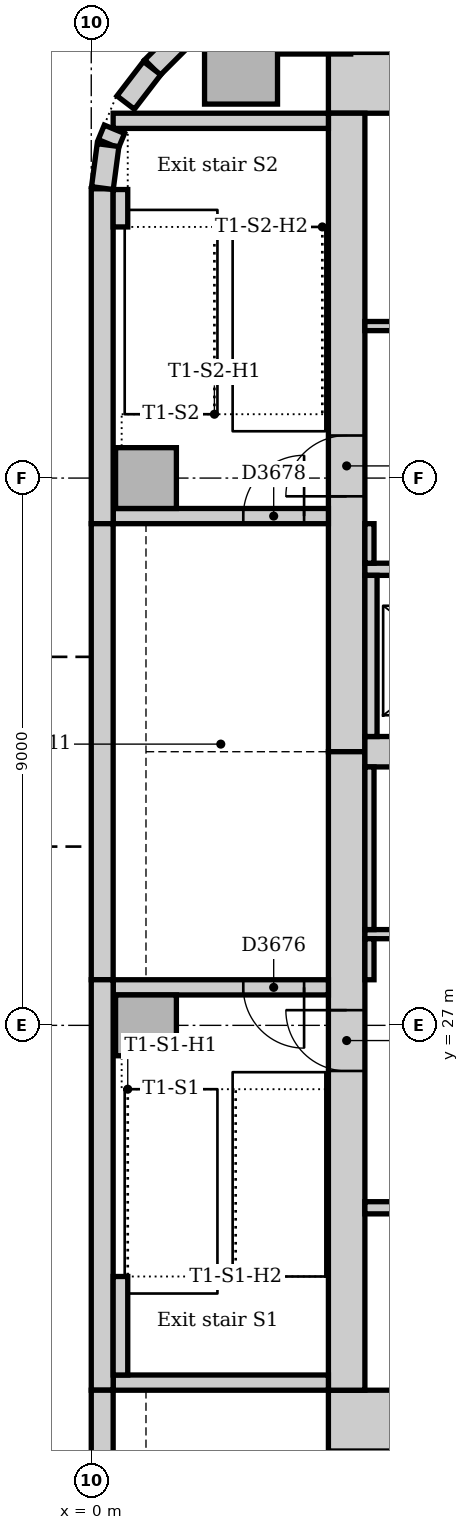
"""IFC4 building model, lengths in metres.
Left out: names, types, materials, properties, quantities, classifications, styles, units other than length and angle.
Written with IfcOpenShell. Run it as: python <this file> out.ifc"""

import sys

from ifc_helpers import new_model, si_unit, direction, frame, frame_2d, origin, origin_2d, place, context, subcontext, project, spatial, rectangle, extrude, element, fill, save


model = new_model("IFC4")
c1 = context("Model", 3, precision=1e-05, world=origin(), true_north=direction((0.0, 1.0)))
c2 = subcontext(c1, "Body", "Model", "MODEL_VIEW")
j1 = project(units=[si_unit("LENGTHUNIT", "METRE"), si_unit("PLANEANGLEUNIT", "RADIAN")], contexts=[c1])
p1 = place(None, origin())
s1 = spatial("IfcSite", under=j1, at=p1, CompositionType="ELEMENT")
p2 = place(p1, origin())
s2 = spatial("IfcBuilding", under=s1, at=p2, CompositionType="ELEMENT")
p3 = place(p2, frame((0.0, 0.0, 75.0)))
s3 = spatial("IfcBuildingStorey", under=s2, at=p3, CompositionType="ELEMENT", Elevation=75.0)
for number, where, z_axis, x_axis in (
    (1, (3.9, 20.5, 0.0), (0.0, 0.0, 1.0), (1.0, 0.0, 0.0)),
    (2, (23.5, 42.5, 0.0), (0.0, 0.0, 1.0), (-1.0, 0.0, 0.0)),
):
    element("IfcWall", number, at=place(p3, frame(where, z_axis=z_axis, x_axis=x_axis)), inside=s3, PredefinedType="SOLIDWALL", context=c2, shape_type="SweptSolid", body=[
        extrude(rectangle(XDim=19.6, YDim=1.0, at=frame_2d((9.8, 0.0))), origin(), (0.0, 0.0, 1.0), 4.0),
    ])
p4 = place(p3, frame((4.2, 42.0, 0.0), z_axis=(0.0, 0.0, 1.0), x_axis=(0.0, -1.0, 0.0)))
e3 = element("IfcWall", 3, at=p4, inside=s3, PredefinedType="SOLIDWALL", context=c2, shape_type="SweptSolid", body=[
    extrude(rectangle(XDim=10.5, YDim=0.6, at=frame_2d((5.25, 0.0))), origin(), (0.0, 0.0, 1.0), 4.0),
])
p5 = place(p4, frame((5.3, 0.0, 0.0)))
e4 = element("IfcOpeningElement", 4, at=p5, cuts=e3, PredefinedType="OPENING", context=c2, shape_type="SweptSolid", body=[
    extrude(rectangle(XDim=1.0, YDim=2.1, at=frame_2d((0.5, 1.05))), frame((0.0, 0.31, 0.0), z_axis=(0.0, -1.0, 0.0), x_axis=(1.0, 0.0, 0.0)), (0.0, 0.0, 1.0), 0.62),
])
p6 = place(p3, frame((4.2, 31.5, 0.0), z_axis=(0.0, 0.0, 1.0), x_axis=(0.0, -1.0, 0.0)))
e5 = element("IfcWall", 5, at=p6, inside=s3, PredefinedType="SOLIDWALL", context=c2, shape_type="SweptSolid", body=[
    extrude(rectangle(XDim=10.5, YDim=0.6, at=frame_2d((5.25, 0.0))), origin(), (0.0, 0.0, 1.0), 4.0),
])
p7 = place(p6, frame((4.25, 0.0, 0.0)))
e6 = element("IfcOpeningElement", 6, at=p7, cuts=e5, PredefinedType="OPENING", context=c2, shape_type="SweptSolid", body=[
    extrude(rectangle(XDim=1.0, YDim=2.1, at=frame_2d((0.5, 1.05))), frame((0.0, 0.31, 0.0), z_axis=(0.0, -1.0, 0.0), x_axis=(1.0, 0.0, 0.0)), (0.0, 0.0, 1.0), 0.62),
])
p8 = place(p3, frame((4.5, 31.5, 0.0), z_axis=(0.0, 0.0, 1.0), x_axis=(1.0, 0.0, 0.0)))
e7 = element("IfcWall", 7, at=p8, inside=s3, PredefinedType="SOLIDWALL", context=c2, shape_type="SweptSolid", body=[
    extrude(rectangle(XDim=18.0, YDim=0.5, at=frame_2d((9.0, 0.0))), origin(), (0.0, 0.0, 1.0), 4.0),
])
p9 = place(p3, frame((0.36, 21.125, 0.0), z_axis=(0.0, 0.0, 1.0), x_axis=(1.0, 0.0, 0.0)))
e8 = element("IfcWall", 8, at=p9, inside=s3, PredefinedType="SOLIDWALL", context=c2, shape_type="SweptSolid", body=[
    extrude(rectangle(XDim=3.54, YDim=0.25, at=frame_2d((1.77, 0.0))), origin(), (0.0, 0.0, 1.0), 4.0),
])
p10 = place(p3, frame((3.9, 27.625, 0.0), z_axis=(0.0, 0.0, 1.0), x_axis=(-1.0, 0.0, 0.0)))
e9 = element("IfcWall", 9, at=p10, inside=s3, PredefinedType="SOLIDWALL", context=c2, shape_type="SweptSolid", body=[
    extrude(rectangle(XDim=3.54, YDim=0.25, at=frame_2d((1.77, 0.0))), origin(), (0.0, 0.0, 1.0), 4.0),
])
p11 = place(p10, frame((0.4, 0.0, 0.0)))
e10 = element("IfcOpeningElement", 10, at=p11, cuts=e9, PredefinedType="OPENING", context=c2, shape_type="SweptSolid", body=[
    extrude(rectangle(XDim=1.0, YDim=2.1, at=frame_2d((0.5, 1.05))), frame((0.0, 0.135, 0.0), z_axis=(0.0, -1.0, 0.0), x_axis=(1.0, 0.0, 0.0)), (0.0, 0.0, 1.0), 0.27),
])
p12 = place(p3, frame((0.36, 35.375, 0.0), z_axis=(0.0, 0.0, 1.0), x_axis=(1.0, 0.0, 0.0)))
e11 = element("IfcWall", 11, at=p12, inside=s3, PredefinedType="SOLIDWALL", context=c2, shape_type="SweptSolid", body=[
    extrude(rectangle(XDim=3.54, YDim=0.25, at=frame_2d((1.77, 0.0))), origin(), (0.0, 0.0, 1.0), 4.0),
])
p13 = place(p12, frame((2.14, 0.0, 0.0)))
e12 = element("IfcOpeningElement", 12, at=p13, cuts=e11, PredefinedType="OPENING", context=c2, shape_type="SweptSolid", body=[
    extrude(rectangle(XDim=1.0, YDim=2.1, at=frame_2d((0.5, 1.05))), frame((0.0, 0.135, 0.0), z_axis=(0.0, -1.0, 0.0), x_axis=(1.0, 0.0, 0.0)), (0.0, 0.0, 1.0), 0.27),
])
p14 = place(p3, frame((3.9, 41.875, 0.0), z_axis=(0.0, 0.0, 1.0), x_axis=(-1.0, 0.0, 0.0)))
e13 = element("IfcWall", 13, at=p14, inside=s3, PredefinedType="SOLIDWALL", context=c2, shape_type="SweptSolid", body=[
    extrude(rectangle(XDim=3.54, YDim=0.25, at=frame_2d((1.77, 0.0))), origin(), (0.0, 0.0, 1.0), 4.0),
])
for number, where, z_axis, x_axis in (
    (14, (3.667, 43.574, 0.0), (0.0, 0.0, 1.0), (1.0, 0.0, 0.0)),
    (15, (2.463, 42.75, 0.0), (0.0, 0.0, 1.0), (1.0, 0.0, 0.0)),
):
    element("IfcColumn", number, at=place(p3, frame(where, z_axis=z_axis, x_axis=x_axis)), inside=s3, PredefinedType="COLUMN", context=c2, shape_type="SweptSolid", body=[
        extrude(rectangle(XDim=1.2, YDim=1.2, at=origin_2d()), origin(), (0.0, 0.0, 1.0), 3.85),
    ])
for number, where, z_axis, x_axis in (
    (16, (0.9, 27.0, 0.0), (0.0, 0.0, 1.0), (1.0, 0.0, 0.0)),
    (17, (0.9, 36.0, 0.0), (0.0, 0.0, 1.0), (1.0, 0.0, 0.0)),
):
    element("IfcColumn", number, at=place(p3, frame(where, z_axis=z_axis, x_axis=x_axis)), inside=s3, PredefinedType="COLUMN", context=c2, shape_type="SweptSolid", body=[
        extrude(rectangle(XDim=1.0, YDim=1.0, at=origin_2d()), origin(), (0.0, 0.0, 1.0), 4.0),
    ])
p15 = place(p3, frame((2.249, 43.994, 0.0), z_axis=(0.0, 0.0, 1.0), x_axis=(-0.707106781187, -0.707106781187, 0.0)))
e18 = element("IfcWall", 18, at=p15, inside=s3, PredefinedType="STANDARD", context=c2, shape_type="SweptSolid", body=[
    extrude(rectangle(XDim=1.757, YDim=0.36, at=frame_2d((0.879, 0.0))), origin(), (0.0, 0.0, 1.0), 3.85),
])
p16 = place(p3, frame((0.18, 40.757, 0.0), z_axis=(0.0, 0.0, 1.0), x_axis=(0.0, -1.0, 0.0)))
e19 = element("IfcWall", 19, at=p16, inside=s3, PredefinedType="STANDARD", context=c2, shape_type="SweptSolid", body=[
    extrude(rectangle(XDim=5.507, YDim=0.36, at=frame_2d((2.754, 0.0))), origin(), (0.0, 0.0, 1.0), 3.85),
])
p17 = place(p3, frame((0.18, 35.25, 0.0), z_axis=(0.0, 0.0, 1.0), x_axis=(0.0, -1.0, 0.0)))
e20 = element("IfcWall", 20, at=p17, inside=s3, PredefinedType="STANDARD", context=c2, shape_type="SweptSolid", body=[
    extrude(rectangle(XDim=7.5, YDim=0.36, at=frame_2d((3.75, 0.0))), origin(), (0.0, 0.0, 1.0), 3.85),
])
p18 = place(p3, frame((0.18, 27.75, 0.0), z_axis=(0.0, 0.0, 1.0), x_axis=(0.0, -1.0, 0.0)))
e21 = element("IfcWall", 21, at=p18, inside=s3, PredefinedType="STANDARD", context=c2, shape_type="SweptSolid", body=[
    extrude(rectangle(XDim=6.75, YDim=0.36, at=frame_2d((3.375, 0.0))), origin(), (0.0, 0.0, 1.0), 3.85),
])
p19 = place(p3, frame((0.18, 21.0, 0.0), z_axis=(0.0, 0.0, 1.0), x_axis=(0.0, -1.0, 0.0)))
e22 = element("IfcWall", 22, at=p19, inside=s3, PredefinedType="STANDARD", context=c2, shape_type="SweptSolid", body=[
    extrude(rectangle(XDim=16.757, YDim=0.36, at=frame_2d((8.379, 0.0))), origin(), (0.0, 0.0, 1.0), 3.85),
])
p20 = place(p19, frame((1.35, 0.0, 0.9)))
e23 = element("IfcOpeningElement", 23, at=p20, cuts=e22, PredefinedType="OPENING", context=c2, shape_type="SweptSolid", body=[
    extrude(rectangle(XDim=3.3, YDim=1.6, at=frame_2d((1.65, 0.8))), frame((0.0, 0.19, 0.0), z_axis=(0.0, -1.0, 0.0), x_axis=(1.0, 0.0, 0.0)), (0.0, 0.0, 1.0), 0.38),
])
p21 = place(p19, frame((5.85, 0.0, 0.9)))
e24 = element("IfcOpeningElement", 24, at=p21, cuts=e22, PredefinedType="OPENING", context=c2, shape_type="SweptSolid", body=[
    extrude(rectangle(XDim=3.3, YDim=1.6, at=frame_2d((1.65, 0.8))), frame((0.0, 0.19, 0.0), z_axis=(0.0, -1.0, 0.0), x_axis=(1.0, 0.0, 0.0)), (0.0, 0.0, 1.0), 0.38),
])
p22 = place(p19, frame((10.35, 0.0, 0.9)))
e25 = element("IfcOpeningElement", 25, at=p22, cuts=e22, PredefinedType="OPENING", context=c2, shape_type="SweptSolid", body=[
    extrude(rectangle(XDim=3.3, YDim=1.6, at=frame_2d((1.65, 0.8))), frame((0.0, 0.19, 0.0), z_axis=(0.0, -1.0, 0.0), x_axis=(1.0, 0.0, 0.0)), (0.0, 0.0, 1.0), 0.38),
])
p23 = place(p3, frame((1.0, 42.741, 0.0), z_axis=(0.0, 0.0, 1.0), x_axis=(-0.608802368033, -0.793321924995, 0.0)))
e26 = element("IfcWall", 26, at=p23, inside=s3, PredefinedType="STANDARD", context=c2, shape_type="SweptSolid", body=[
    extrude(rectangle(XDim=0.713, YDim=0.36, at=frame_2d((0.357, 0.0))), origin(), (0.0, 0.0, 1.0), 3.85),
])
p24 = place(p3, frame((0.381, 41.736, 0.0), z_axis=(0.0, 0.0, 1.0), x_axis=(-0.382773360986, -0.923842277729, 0.0)))
e27 = element("IfcWall", 27, at=p24, inside=s3, PredefinedType="STANDARD", context=c2, shape_type="SweptSolid", body=[
    extrude(rectangle(XDim=0.258, YDim=0.36, at=frame_2d((0.129, 0.0))), origin(), (0.0, 0.0, 1.0), 3.85),
])
p25 = place(p3, frame((0.276, 41.476, 0.0), z_axis=(0.0, 0.0, 1.0), x_axis=(-0.13055608231, -0.99144092581, 0.0)))
e28 = element("IfcWall", 28, at=p25, inside=s3, PredefinedType="STANDARD", context=c2, shape_type="SweptSolid", body=[
    extrude(rectangle(XDim=0.713, YDim=0.36, at=frame_2d((0.356, 0.0))), origin(), (0.0, 0.0, 1.0), 3.85),
])
p26 = place(p3, frame((0.48, 21.25, 0.0), z_axis=(0.0, 0.0, 1.0), x_axis=(0.0, 1.0, 0.0)))
e29 = element("IfcWall", 29, at=p26, inside=s3, PredefinedType="STANDARD", context=c2, shape_type="SweptSolid", body=[
    extrude(rectangle(XDim=1.62, YDim=0.24, at=frame_2d((0.81, 0.0))), origin(), (0.0, 0.0, 1.0), 4.0),
])
p27 = place(p3, frame((0.48, 40.13, 0.0), z_axis=(0.0, 0.0, 1.0), x_axis=(0.0, 1.0, 0.0)))
e30 = element("IfcWall", 30, at=p27, inside=s3, PredefinedType="STANDARD", context=c2, shape_type="SweptSolid", body=[
    extrude(rectangle(XDim=0.615, YDim=0.24, at=frame_2d((0.307, 0.0))), origin(), (0.0, 0.0, 1.0), 4.0),
])
p28 = place(p3, frame((4.5, 24.0, 0.0), z_axis=(0.0, 0.0, 1.0), x_axis=(1.0, 0.0, 0.0)))
e31 = element("IfcWall", 31, at=p28, inside=s3, PredefinedType="PARTITIONING", context=c2, shape_type="SweptSolid", body=[
    extrude(rectangle(XDim=18.0, YDim=0.2, at=frame_2d((9.0, 0.0))), origin(), (0.0, 0.0, 1.0), 3.85),
])
p29 = place(p28, frame((0.95, 0.0, 0.0)))
e32 = element("IfcOpeningElement", 32, at=p29, cuts=e31, PredefinedType="OPENING", context=c2, shape_type="SweptSolid", body=[
    extrude(rectangle(XDim=1.1, YDim=2.1, at=frame_2d((0.55, 1.05))), frame((0.0, 0.11, 0.0), z_axis=(0.0, -1.0, 0.0), x_axis=(1.0, 0.0, 0.0)), (0.0, 0.0, 1.0), 0.22),
])
p30 = place(p28, frame((3.95, 0.0, 0.0)))
e33 = element("IfcOpeningElement", 33, at=p30, cuts=e31, PredefinedType="OPENING", context=c2, shape_type="SweptSolid", body=[
    extrude(rectangle(XDim=1.1, YDim=2.1, at=frame_2d((0.55, 1.05))), frame((0.0, 0.11, 0.0), z_axis=(0.0, -1.0, 0.0), x_axis=(1.0, 0.0, 0.0)), (0.0, 0.0, 1.0), 0.22),
])
p31 = place(p28, frame((6.95, 0.0, 0.0)))
e34 = element("IfcOpeningElement", 34, at=p31, cuts=e31, PredefinedType="OPENING", context=c2, shape_type="SweptSolid", body=[
    extrude(rectangle(XDim=1.1, YDim=2.1, at=frame_2d((0.55, 1.05))), frame((0.0, 0.11, 0.0), z_axis=(0.0, -1.0, 0.0), x_axis=(1.0, 0.0, 0.0)), (0.0, 0.0, 1.0), 0.22),
])
p32 = place(p28, frame((9.95, 0.0, 0.0)))
e35 = element("IfcOpeningElement", 35, at=p32, cuts=e31, PredefinedType="OPENING", context=c2, shape_type="SweptSolid", body=[
    extrude(rectangle(XDim=1.1, YDim=2.1, at=frame_2d((0.55, 1.05))), frame((0.0, 0.11, 0.0), z_axis=(0.0, -1.0, 0.0), x_axis=(1.0, 0.0, 0.0)), (0.0, 0.0, 1.0), 0.22),
])
p33 = place(p28, frame((12.95, 0.0, 0.0)))
e36 = element("IfcOpeningElement", 36, at=p33, cuts=e31, PredefinedType="OPENING", context=c2, shape_type="SweptSolid", body=[
    extrude(rectangle(XDim=1.1, YDim=2.1, at=frame_2d((0.55, 1.05))), frame((0.0, 0.11, 0.0), z_axis=(0.0, -1.0, 0.0), x_axis=(1.0, 0.0, 0.0)), (0.0, 0.0, 1.0), 0.22),
])
p34 = place(p28, frame((15.95, 0.0, 0.0)))
e37 = element("IfcOpeningElement", 37, at=p34, cuts=e31, PredefinedType="OPENING", context=c2, shape_type="SweptSolid", body=[
    extrude(rectangle(XDim=1.1, YDim=2.1, at=frame_2d((0.55, 1.05))), frame((0.0, 0.11, 0.0), z_axis=(0.0, -1.0, 0.0), x_axis=(1.0, 0.0, 0.0)), (0.0, 0.0, 1.0), 0.22),
])
p35 = place(p3, frame((4.5, 34.5, 0.0), z_axis=(0.0, 0.0, 1.0), x_axis=(1.0, 0.0, 0.0)))
e38 = element("IfcWall", 38, at=p35, inside=s3, PredefinedType="PARTITIONING", context=c2, shape_type="SweptSolid", body=[
    extrude(rectangle(XDim=18.0, YDim=0.2, at=frame_2d((9.0, 0.0))), origin(), (0.0, 0.0, 1.0), 3.85),
])
p36 = place(p35, frame((0.95, 0.0, 0.0)))
e39 = element("IfcOpeningElement", 39, at=p36, cuts=e38, PredefinedType="OPENING", context=c2, shape_type="SweptSolid", body=[
    extrude(rectangle(XDim=1.1, YDim=2.1, at=frame_2d((0.55, 1.05))), frame((0.0, 0.11, 0.0), z_axis=(0.0, -1.0, 0.0), x_axis=(1.0, 0.0, 0.0)), (0.0, 0.0, 1.0), 0.22),
])
p37 = place(p35, frame((3.95, 0.0, 0.0)))
e40 = element("IfcOpeningElement", 40, at=p37, cuts=e38, PredefinedType="OPENING", context=c2, shape_type="SweptSolid", body=[
    extrude(rectangle(XDim=1.1, YDim=2.1, at=frame_2d((0.55, 1.05))), frame((0.0, 0.11, 0.0), z_axis=(0.0, -1.0, 0.0), x_axis=(1.0, 0.0, 0.0)), (0.0, 0.0, 1.0), 0.22),
])
p38 = place(p35, frame((12.95, 0.0, 0.0)))
e41 = element("IfcOpeningElement", 41, at=p38, cuts=e38, PredefinedType="OPENING", context=c2, shape_type="SweptSolid", body=[
    extrude(rectangle(XDim=1.1, YDim=2.1, at=frame_2d((0.55, 1.05))), frame((0.0, 0.11, 0.0), z_axis=(0.0, -1.0, 0.0), x_axis=(1.0, 0.0, 0.0)), (0.0, 0.0, 1.0), 0.22),
])
p39 = place(p35, frame((15.95, 0.0, 0.0)))
e42 = element("IfcOpeningElement", 42, at=p39, cuts=e38, PredefinedType="OPENING", context=c2, shape_type="SweptSolid", body=[
    extrude(rectangle(XDim=1.1, YDim=2.1, at=frame_2d((0.55, 1.05))), frame((0.0, 0.11, 0.0), z_axis=(0.0, -1.0, 0.0), x_axis=(1.0, 0.0, 0.0)), (0.0, 0.0, 1.0), 0.22),
])
p40 = place(p3, frame((4.6, 31.75, 0.0), z_axis=(0.0, 0.0, 1.0), x_axis=(0.0, 1.0, 0.0)))
e43 = element("IfcWall", 43, at=p40, inside=s3, PredefinedType="PARTITIONING", context=c2, shape_type="SweptSolid", body=[
    extrude(rectangle(XDim=2.65, YDim=0.2, at=frame_2d((1.325, 0.0))), origin(), (0.0, 0.0, 1.0), 3.85),
])
p41 = place(p3, frame((4.5, 28.5, 0.0), z_axis=(0.0, 0.0, 1.0), x_axis=(1.0, 0.0, 0.0)))
e44 = element("IfcWall", 44, at=p41, inside=s3, PredefinedType="PARTITIONING", context=c2, shape_type="SweptSolid", body=[
    extrude(rectangle(XDim=18.0, YDim=0.15, at=frame_2d((9.0, 0.0))), origin(), (0.0, 0.0, 1.0), 3.85),
])
p42 = place(p41, frame((4.1, 0.0, 0.0)))
e45 = element("IfcOpeningElement", 45, at=p42, cuts=e44, PredefinedType="OPENING", context=c2, shape_type="SweptSolid", body=[
    extrude(rectangle(XDim=0.9, YDim=2.1, at=frame_2d((0.45, 1.05))), frame((0.0, 0.085, 0.0), z_axis=(0.0, -1.0, 0.0), x_axis=(1.0, 0.0, 0.0)), (0.0, 0.0, 1.0), 0.17),
])
p43 = place(p41, frame((10.8, 0.0, 0.0)))
e46 = element("IfcOpeningElement", 46, at=p43, cuts=e44, PredefinedType="OPENING", context=c2, shape_type="SweptSolid", body=[
    extrude(rectangle(XDim=0.9, YDim=2.1, at=frame_2d((0.45, 1.05))), frame((0.0, 0.085, 0.0), z_axis=(0.0, -1.0, 0.0), x_axis=(1.0, 0.0, 0.0)), (0.0, 0.0, 1.0), 0.17),
])
p44 = place(p41, frame((15.2, 0.0, 0.0)))
e47 = element("IfcOpeningElement", 47, at=p44, cuts=e44, PredefinedType="OPENING", context=c2, shape_type="SweptSolid", body=[
    extrude(rectangle(XDim=0.9, YDim=2.1, at=frame_2d((0.45, 1.05))), frame((0.0, 0.085, 0.0), z_axis=(0.0, -1.0, 0.0), x_axis=(1.0, 0.0, 0.0)), (0.0, 0.0, 1.0), 0.17),
])
p45 = place(p3, frame((4.5, 38.5, 0.0), z_axis=(0.0, 0.0, 1.0), x_axis=(1.0, 0.0, 0.0)))
e48 = element("IfcWall", 48, at=p45, inside=s3, PredefinedType="PARTITIONING", context=c2, shape_type="SweptSolid", body=[
    extrude(rectangle(XDim=11.9, YDim=0.15, at=frame_2d((5.95, 0.0))), origin(), (0.0, 0.0, 1.0), 3.85),
])
p46 = place(p45, frame((1.1, 0.0, 0.0)))
e49 = element("IfcOpeningElement", 49, at=p46, cuts=e48, PredefinedType="OPENING", context=c2, shape_type="SweptSolid", body=[
    extrude(rectangle(XDim=0.9, YDim=2.1, at=frame_2d((0.45, 1.05))), frame((0.0, 0.085, 0.0), z_axis=(0.0, -1.0, 0.0), x_axis=(1.0, 0.0, 0.0)), (0.0, 0.0, 1.0), 0.17),
])
p47 = place(p45, frame((4.05, 0.0, 0.0)))
e50 = element("IfcOpeningElement", 50, at=p47, cuts=e48, PredefinedType="OPENING", context=c2, shape_type="SweptSolid", body=[
    extrude(rectangle(XDim=0.9, YDim=2.1, at=frame_2d((0.45, 1.05))), frame((0.0, 0.085, 0.0), z_axis=(0.0, -1.0, 0.0), x_axis=(1.0, 0.0, 0.0)), (0.0, 0.0, 1.0), 0.17),
])
p48 = place(p45, frame((7.05, 0.0, 0.0)))
e51 = element("IfcOpeningElement", 51, at=p48, cuts=e48, PredefinedType="OPENING", context=c2, shape_type="SweptSolid", body=[
    extrude(rectangle(XDim=0.9, YDim=2.1, at=frame_2d((0.45, 1.05))), frame((0.0, 0.085, 0.0), z_axis=(0.0, -1.0, 0.0), x_axis=(1.0, 0.0, 0.0)), (0.0, 0.0, 1.0), 0.17),
])
p49 = place(p45, frame((9.95, 0.0, 0.0)))
e52 = element("IfcOpeningElement", 52, at=p49, cuts=e48, PredefinedType="OPENING", context=c2, shape_type="SweptSolid", body=[
    extrude(rectangle(XDim=0.8, YDim=2.1, at=frame_2d((0.4, 1.05))), frame((0.0, 0.085, 0.0), z_axis=(0.0, -1.0, 0.0), x_axis=(1.0, 0.0, 0.0)), (0.0, 0.0, 1.0), 0.17),
])
p50 = place(p3, frame((4.575, 27.75, 0.0), z_axis=(0.0, 0.0, 1.0), x_axis=(0.0, 1.0, 0.0)))
e53 = element("IfcWall", 53, at=p50, inside=s3, PredefinedType="PARTITIONING", context=c2, shape_type="SweptSolid", body=[
    extrude(rectangle(XDim=0.675, YDim=0.15, at=frame_2d((0.338, 0.0))), origin(), (0.0, 0.0, 1.0), 3.85),
])
p51 = place(p3, frame((4.575, 28.575, 0.0), z_axis=(0.0, 0.0, 1.0), x_axis=(0.0, 1.0, 0.0)))
e54 = element("IfcWall", 54, at=p51, inside=s3, PredefinedType="PARTITIONING", context=c2, shape_type="SweptSolid", body=[
    extrude(rectangle(XDim=2.675, YDim=0.15, at=frame_2d((1.337, 0.0))), origin(), (0.0, 0.0, 1.0), 3.85),
])
p52 = place(p3, frame((4.575, 34.6, 0.0), z_axis=(0.0, 0.0, 1.0), x_axis=(0.0, 1.0, 0.0)))
e55 = element("IfcWall", 55, at=p52, inside=s3, PredefinedType="PARTITIONING", context=c2, shape_type="SweptSolid", body=[
    extrude(rectangle(XDim=0.65, YDim=0.15, at=frame_2d((0.325, 0.0))), origin(), (0.0, 0.0, 1.0), 3.85),
])
p53 = place(p7, frame((1.0, 0.0, 0.0), z_axis=(0.0, 0.0, 1.0), x_axis=(-1.0, 0.0, 0.0)))
e56 = element("IfcDoor", 56, at=p53, inside=s3, OperationType="SINGLE_SWING_RIGHT", PredefinedType="DOOR", context=c2, shape_type="SweptSolid", body=[
    extrude(rectangle(XDim=1.0, YDim=2.1, at=frame_2d((0.5, 1.05))), frame((0.0, 0.025, 0.0), z_axis=(0.0, -1.0, 0.0), x_axis=(1.0, 0.0, 0.0)), (0.0, 0.0, 1.0), 0.05),
])
fill(e6, e56)
p54 = place(p11, origin())
e57 = element("IfcDoor", 57, at=p54, inside=s3, OperationType="SINGLE_SWING_LEFT", PredefinedType="DOOR", context=c2, shape_type="SweptSolid", body=[
    extrude(rectangle(XDim=1.0, YDim=2.1, at=frame_2d((0.5, 1.05))), frame((0.0, 0.025, 0.0), z_axis=(0.0, -1.0, 0.0), x_axis=(1.0, 0.0, 0.0)), (0.0, 0.0, 1.0), 0.05),
])
fill(e10, e57)
p55 = place(p5, frame((1.0, 0.0, 0.0), z_axis=(0.0, 0.0, 1.0), x_axis=(-1.0, 0.0, 0.0)))
e58 = element("IfcDoor", 58, at=p55, inside=s3, OperationType="SINGLE_SWING_LEFT", PredefinedType="DOOR", context=c2, shape_type="SweptSolid", body=[
    extrude(rectangle(XDim=1.0, YDim=2.1, at=frame_2d((0.5, 1.05))), frame((0.0, 0.025, 0.0), z_axis=(0.0, -1.0, 0.0), x_axis=(1.0, 0.0, 0.0)), (0.0, 0.0, 1.0), 0.05),
])
fill(e4, e58)
p56 = place(p13, origin())
e59 = element("IfcDoor", 59, at=p56, inside=s3, OperationType="SINGLE_SWING_RIGHT", PredefinedType="DOOR", context=c2, shape_type="SweptSolid", body=[
    extrude(rectangle(XDim=1.0, YDim=2.1, at=frame_2d((0.5, 1.05))), frame((0.0, 0.025, 0.0), z_axis=(0.0, -1.0, 0.0), x_axis=(1.0, 0.0, 0.0)), (0.0, 0.0, 1.0), 0.05),
])
fill(e12, e59)
save(model, sys.argv[1])
